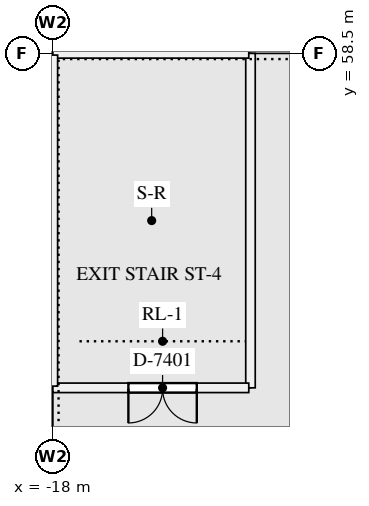
"""IFC4 building model, lengths in metres.
Left out: names, types, materials, properties, quantities, classifications, styles, units other than length and angle.
Written with IfcOpenShell. Run it as: python <this file> out.ifc"""

import sys

from ifc_helpers import new_model, si_unit, direction, frame, frame_2d, origin, place, context, subcontext, project, spatial, rectangle, extrude, element, fill, save


model = new_model("IFC4")
c1 = context("Model", 3, precision=1e-05, world=origin(), true_north=direction((0.0, 1.0)))
c2 = subcontext(c1, "Body", "Model", "MODEL_VIEW")
j1 = project(units=[si_unit("LENGTHUNIT", "METRE"), si_unit("PLANEANGLEUNIT", "RADIAN")], contexts=[c1])
p1 = place(None, origin())
s1 = spatial("IfcSite", under=j1, at=p1, CompositionType="ELEMENT")
p2 = place(p1, origin())
s2 = spatial("IfcBuilding", under=s1, at=p2, CompositionType="ELEMENT")
p3 = place(p2, frame((0.0, 0.0, 11.0)))
s3 = spatial("IfcBuildingStorey", under=s2, at=p3, CompositionType="ELEMENT", Elevation=11.0)
p4 = place(p3, frame((-12.8, 49.7, 0.0), z_axis=(0.0, 0.0, 1.0), x_axis=(0.0, 1.0, 0.0)))
e1 = element("IfcWall", 1, at=p4, inside=s3, PredefinedType="SOLIDWALL", context=c2, shape_type="SweptSolid", body=[
    extrude(rectangle(XDim=8.8, YDim=0.25, at=frame_2d((4.4, 0.0))), origin(), (0.0, 0.0, 1.0), 3.9),
])
p5 = place(p3, frame((-18.0, 58.5, 0.0), z_axis=(0.0, 0.0, 1.0), x_axis=(1.0, 0.0, 0.0)))
e2 = element("IfcWall", 2, at=p5, inside=s3, PredefinedType="SOLIDWALL", context=c2, shape_type="SweptSolid", body=[
    extrude(rectangle(XDim=5.155, YDim=0.25, at=frame_2d((2.578, 0.0))), origin(), (0.0, 0.0, 1.0), 3.9),
])
p6 = place(p3, frame((-18.0, 49.7, 0.0), z_axis=(0.0, 0.0, 1.0), x_axis=(1.0, 0.0, 0.0)))
e3 = element("IfcWall", 3, at=p6, inside=s3, PredefinedType="SOLIDWALL", context=c2, shape_type="SweptSolid", body=[
    extrude(rectangle(XDim=5.155, YDim=0.25, at=frame_2d((2.578, 0.0))), origin(), (0.0, 0.0, 1.0), 3.9),
])
p7 = place(p6, frame((1.987, 0.0, 0.0)))
e4 = element("IfcOpeningElement", 4, at=p7, cuts=e3, PredefinedType="OPENING", context=c2, shape_type="SweptSolid", body=[
    extrude(rectangle(XDim=1.8, YDim=2.4, at=frame_2d((0.9, 1.2))), frame((0.0, 0.135, 0.0), z_axis=(0.0, -1.0, 0.0), x_axis=(1.0, 0.0, 0.0)), (0.0, 0.0, 1.0), 0.27),
])
p8 = place(p3, frame((-18.0, 49.745, 0.0), z_axis=(0.0, 0.0, 1.0), x_axis=(0.0, 1.0, 0.0)))
e5 = element("IfcWall", 5, at=p8, inside=s3, PredefinedType="SOLIDWALL", context=c2, shape_type="SweptSolid", body=[
    extrude(rectangle(XDim=8.71, YDim=0.25, at=frame_2d((4.355, 0.0))), origin(), (0.0, 0.0, 1.0), 3.9),
])
p9 = place(p7, frame((1.8, 0.0, 0.0), z_axis=(0.0, 0.0, 1.0), x_axis=(-1.0, 0.0, 0.0)))
e6 = element("IfcDoor", 6, at=p9, inside=s3, OperationType="DOUBLE_DOOR_SINGLE_SWING", PredefinedType="DOOR", context=c2, shape_type="SweptSolid", body=[
    extrude(rectangle(XDim=1.8, YDim=2.4, at=frame_2d((0.9, 1.2))), frame((0.0, 0.025, 0.0), z_axis=(0.0, -1.0, 0.0), x_axis=(1.0, 0.0, 0.0)), (0.0, 0.0, 1.0), 0.05),
])
fill(e4, e6)
save(model, sys.argv[1])
